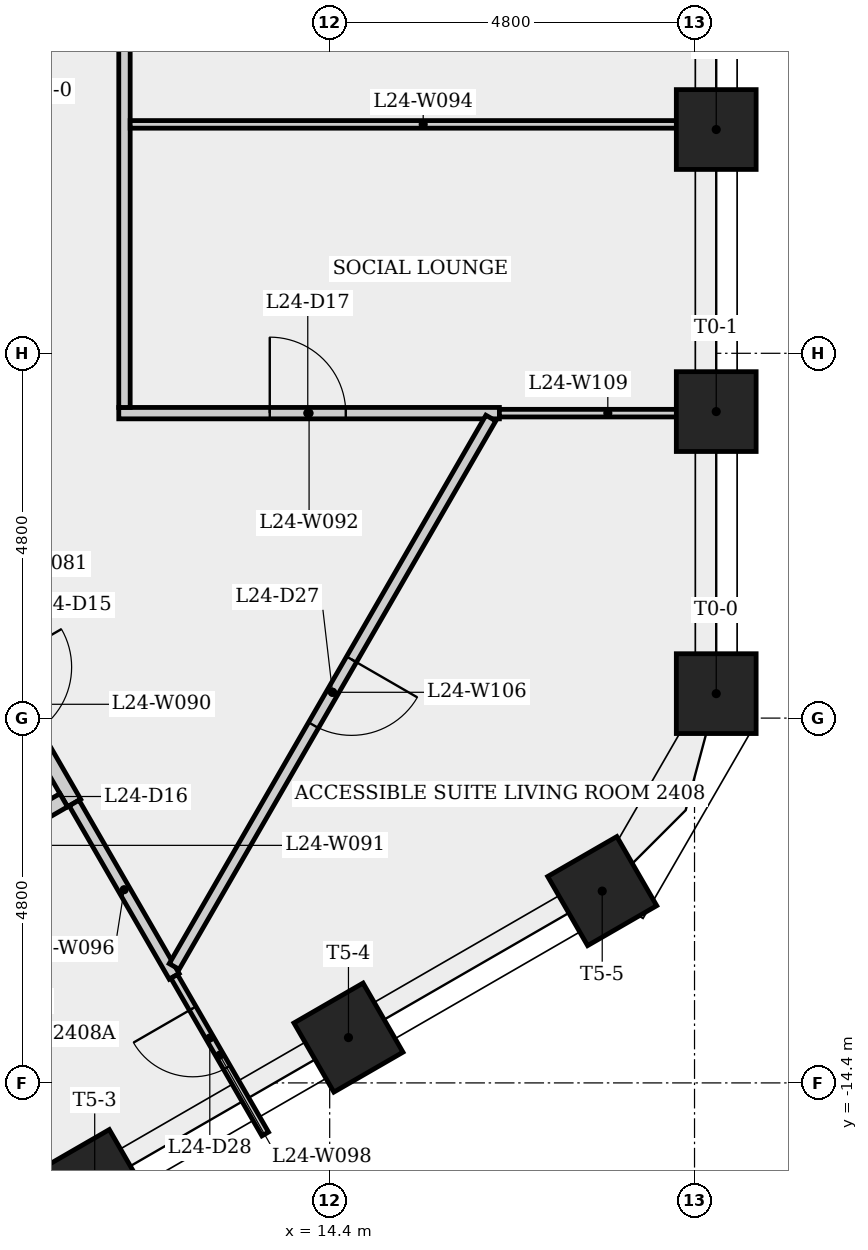
"""IFC4 building model, lengths in metres.
Left out: names, types, materials, properties, quantities, classifications, styles, units other than length and angle.
Written with IfcOpenShell. Run it as: python <this file> out.ifc"""

import sys

from ifc_helpers import new_model, si_unit, direction, frame, frame_2d, origin, origin_2d, place, context, subcontext, project, spatial, rectangle, extrude, element, fill, save


model = new_model("IFC4")
c1 = context("Model", 3, precision=1e-05, world=origin(), true_north=direction((0.0, 1.0)))
c2 = subcontext(c1, "Body", "Model", "MODEL_VIEW")
j1 = project(units=[si_unit("LENGTHUNIT", "METRE"), si_unit("PLANEANGLEUNIT", "RADIAN")], contexts=[c1])
p1 = place(None, origin())
s1 = spatial("IfcSite", under=j1, at=p1, CompositionType="ELEMENT")
p2 = place(p1, origin())
s2 = spatial("IfcBuilding", under=s1, at=p2, CompositionType="ELEMENT")
p3 = place(p2, frame((0.0, 0.0, 93.3)))
s3 = spatial("IfcBuildingStorey", under=s2, at=p3, CompositionType="ELEMENT", Elevation=93.3)
for number, where, z_axis, x_axis in (
    (1, (19.486, -9.278, 0.0), (0.0, 0.0, 1.0), (1.0, 0.0, 0.0)),
    (2, (19.486, -5.567, 0.0), (0.0, 0.0, 1.0), (1.0, 0.0, 0.0)),
    (3, (19.486, -1.856, 0.0), (0.0, 0.0, 1.0), (1.0, 0.0, 0.0)),
    (4, (11.308, -15.731, 0.0), (0.0, 0.0, 1.0), (0.5, -0.866, 0.0)),
    (5, (14.647, -13.804, 0.0), (0.0, 0.0, 1.0), (0.5, -0.866, 0.0)),
    (6, (17.986, -11.876, 0.0), (0.0, 0.0, 1.0), (0.5, -0.866, 0.0)),
):
    element("IfcColumn", number, at=place(p3, frame(where, z_axis=z_axis, x_axis=x_axis)), inside=s3, PredefinedType="COLUMN", context=c2, shape_type="SweptSolid", body=[
        extrude(rectangle(XDim=1.05, YDim=1.05, at=origin_2d()), origin(), (0.0, 0.0, 1.0), 3.4),
    ])
p4 = place(p3, frame((9.537, -8.119, 0.0), z_axis=(0.0, 0.0, 1.0), x_axis=(0.499990139034, -0.866031096941, 0.0)))
e7 = element("IfcWall", 7, at=p4, inside=s3, PredefinedType="PARTITIONING", context=c2, shape_type="SweptSolid", body=[
    extrude(rectangle(XDim=3.0, YDim=0.2, at=frame_2d((1.5, 0.0))), origin(), (0.0, 0.0, 1.0), 3.05),
])
p5 = place(p4, frame((0.935, 0.0, 0.0)))
e8 = element("IfcOpeningElement", 8, at=p5, cuts=e7, PredefinedType="OPENING", context=c2, shape_type="SweptSolid", body=[
    extrude(rectangle(XDim=1.0, YDim=2.1, at=frame_2d((0.5, 1.05))), frame((0.0, 0.11, 0.0), z_axis=(0.0, -1.0, 0.0), x_axis=(1.0, 0.0, 0.0)), (0.0, 0.0, 1.0), 0.22),
])
p6 = place(p3, frame((10.901, -10.681, 0.0), z_axis=(0.0, 0.0, 1.0), x_axis=(-0.866007538022, -0.500030943131, 0.0)))
e9 = element("IfcWall", 9, at=p6, inside=s3, PredefinedType="PARTITIONING", context=c2, shape_type="SweptSolid", body=[
    extrude(rectangle(XDim=2.375, YDim=0.2, at=frame_2d((1.188, 0.0))), origin(), (0.0, 0.0, 1.0), 3.05),
])
p7 = place(p3, frame((11.625, -5.587, 0.0), z_axis=(0.0, 0.0, 1.0), x_axis=(1.0, 0.0, 0.0)))
e10 = element("IfcWall", 10, at=p7, inside=s3, PredefinedType="PARTITIONING", context=c2, shape_type="SweptSolid", body=[
    extrude(rectangle(XDim=5.008, YDim=0.15, at=frame_2d((2.504, 0.0))), origin(), (0.0, 0.0, 1.0), 3.05),
])
p8 = place(p7, frame((1.987, 0.0, 0.0)))
e11 = element("IfcOpeningElement", 11, at=p8, cuts=e10, PredefinedType="OPENING", context=c2, shape_type="SweptSolid", body=[
    extrude(rectangle(XDim=1.0, YDim=2.1, at=frame_2d((0.5, 1.05))), frame((0.0, 0.085, 0.0), z_axis=(0.0, -1.0, 0.0), x_axis=(1.0, 0.0, 0.0)), (0.0, 0.0, 1.0), 0.17),
])
p9 = place(p3, frame((11.7, -5.512, 0.0), z_axis=(0.0, 0.0, 1.0), x_axis=(0.0, 1.0, 0.0)))
e12 = element("IfcWall", 12, at=p9, inside=s3, PredefinedType="PARTITIONING", context=c2, shape_type="SweptSolid", body=[
    extrude(rectangle(XDim=10.675, YDim=0.15, at=frame_2d((5.337, 0.0))), origin(), (0.0, 0.0, 1.0), 3.05),
])
p10 = place(p9, frame((6.677, 0.0, 0.0)))
e13 = element("IfcOpeningElement", 13, at=p10, cuts=e12, PredefinedType="OPENING", context=c2, shape_type="SweptSolid", body=[
    extrude(rectangle(XDim=1.0, YDim=2.1, at=frame_2d((0.5, 1.05))), frame((0.0, 0.085, 0.0), z_axis=(0.0, -1.0, 0.0), x_axis=(1.0, 0.0, 0.0)), (0.0, 0.0, 1.0), 0.17),
])
p11 = place(p3, frame((11.775, -1.788, 0.0), z_axis=(0.0, 0.0, 1.0), x_axis=(1.0, 0.0, 0.0)))
e14 = element("IfcWall", 14, at=p11, inside=s3, PredefinedType="PARTITIONING", context=c2, shape_type="SweptSolid", body=[
    extrude(rectangle(XDim=7.711, YDim=0.1, at=frame_2d((3.855, 0.0))), origin(), (0.0, 0.0, 1.0), 3.05),
])
p12 = place(p3, frame((12.354, -12.998, 0.0), z_axis=(0.0, 0.0, 1.0), x_axis=(-0.49998723852, 0.866032771503, 0.0)))
e15 = element("IfcWall", 15, at=p12, inside=s3, PredefinedType="PARTITIONING", context=c2, shape_type="SweptSolid", body=[
    extrude(rectangle(XDim=2.634, YDim=0.15, at=frame_2d((1.317, 0.0))), origin(), (0.0, 0.0, 1.0), 3.05),
])
p13 = place(p3, frame((13.552, -15.072, 0.0), z_axis=(0.0, 0.0, 1.0), x_axis=(-0.499954846121, 0.866051471819, 0.0)))
e16 = element("IfcWall", 16, at=p13, inside=s3, PredefinedType="PARTITIONING", context=c2, shape_type="SweptSolid", body=[
    extrude(rectangle(XDim=2.395, YDim=0.1, at=frame_2d((1.197, 0.0))), origin(), (0.0, 0.0, 1.0), 3.05),
])
p14 = place(p13, frame((1.008, 0.0, 0.0)))
e17 = element("IfcOpeningElement", 17, at=p14, cuts=e16, PredefinedType="OPENING", context=c2, shape_type="SweptSolid", body=[
    extrude(rectangle(XDim=0.9, YDim=2.1, at=frame_2d((0.45, 1.05))), frame((0.0, 0.06, 0.0), z_axis=(0.0, -1.0, 0.0), x_axis=(1.0, 0.0, 0.0)), (0.0, 0.0, 1.0), 0.12),
])
p15 = place(p3, frame((16.52, -5.652, 0.0), z_axis=(0.0, 0.0, 1.0), x_axis=(-0.499996383721, -0.866027491634, 0.0)))
e18 = element("IfcWall", 18, at=p15, inside=s3, PredefinedType="PARTITIONING", context=c2, shape_type="SweptSolid", body=[
    extrude(rectangle(XDim=8.332, YDim=0.15, at=frame_2d((4.166, 0.0))), origin(), (0.0, 0.0, 1.0), 3.05),
])
p16 = place(p15, frame((3.666, 0.0, 0.0)))
e19 = element("IfcOpeningElement", 19, at=p16, cuts=e18, PredefinedType="OPENING", context=c2, shape_type="SweptSolid", body=[
    extrude(rectangle(XDim=1.0, YDim=2.1, at=frame_2d((0.5, 1.05))), frame((0.0, 0.085, 0.0), z_axis=(0.0, -1.0, 0.0), x_axis=(1.0, 0.0, 0.0)), (0.0, 0.0, 1.0), 0.17),
])
p17 = place(p3, frame((19.486, -5.587, 0.0), z_axis=(0.0, 0.0, 1.0), x_axis=(-1.0, 0.0, 0.0)))
e20 = element("IfcWall", 20, at=p17, inside=s3, PredefinedType="PARTITIONING", context=c2, shape_type="SweptSolid", body=[
    extrude(rectangle(XDim=2.853, YDim=0.1, at=frame_2d((1.426, 0.0))), origin(), (0.0, 0.0, 1.0), 3.05),
])
p18 = place(p8, origin())
e21 = element("IfcDoor", 21, at=p18, inside=s3, OperationType="SINGLE_SWING_LEFT", PredefinedType="DOOR", context=c2, shape_type="SweptSolid", body=[
    extrude(rectangle(XDim=1.0, YDim=2.1, at=frame_2d((0.5, 1.05))), frame((0.0, 0.025, 0.0), z_axis=(0.0, -1.0, 0.0), x_axis=(1.0, 0.0, 0.0)), (0.0, 0.0, 1.0), 0.05),
])
fill(e11, e21)
p19 = place(p16, origin())
e22 = element("IfcDoor", 22, at=p19, inside=s3, OperationType="SINGLE_SWING_LEFT", PredefinedType="DOOR", context=c2, shape_type="SweptSolid", body=[
    extrude(rectangle(XDim=1.0, YDim=2.1, at=frame_2d((0.5, 1.05))), frame((0.0, 0.025, 0.0), z_axis=(0.0, -1.0, 0.0), x_axis=(1.0, 0.0, 0.0)), (0.0, 0.0, 1.0), 0.05),
])
fill(e19, e22)
p20 = place(p14, origin())
e23 = element("IfcDoor", 23, at=p20, inside=s3, OperationType="SINGLE_SWING_RIGHT", PredefinedType="DOOR", context=c2, shape_type="SweptSolid", body=[
    extrude(rectangle(XDim=0.9, YDim=2.1, at=frame_2d((0.45, 1.05))), frame((0.0, 0.025, 0.0), z_axis=(0.0, -1.0, 0.0), x_axis=(1.0, 0.0, 0.0)), (0.0, 0.0, 1.0), 0.05),
])
fill(e17, e23)
save(model, sys.argv[1])
